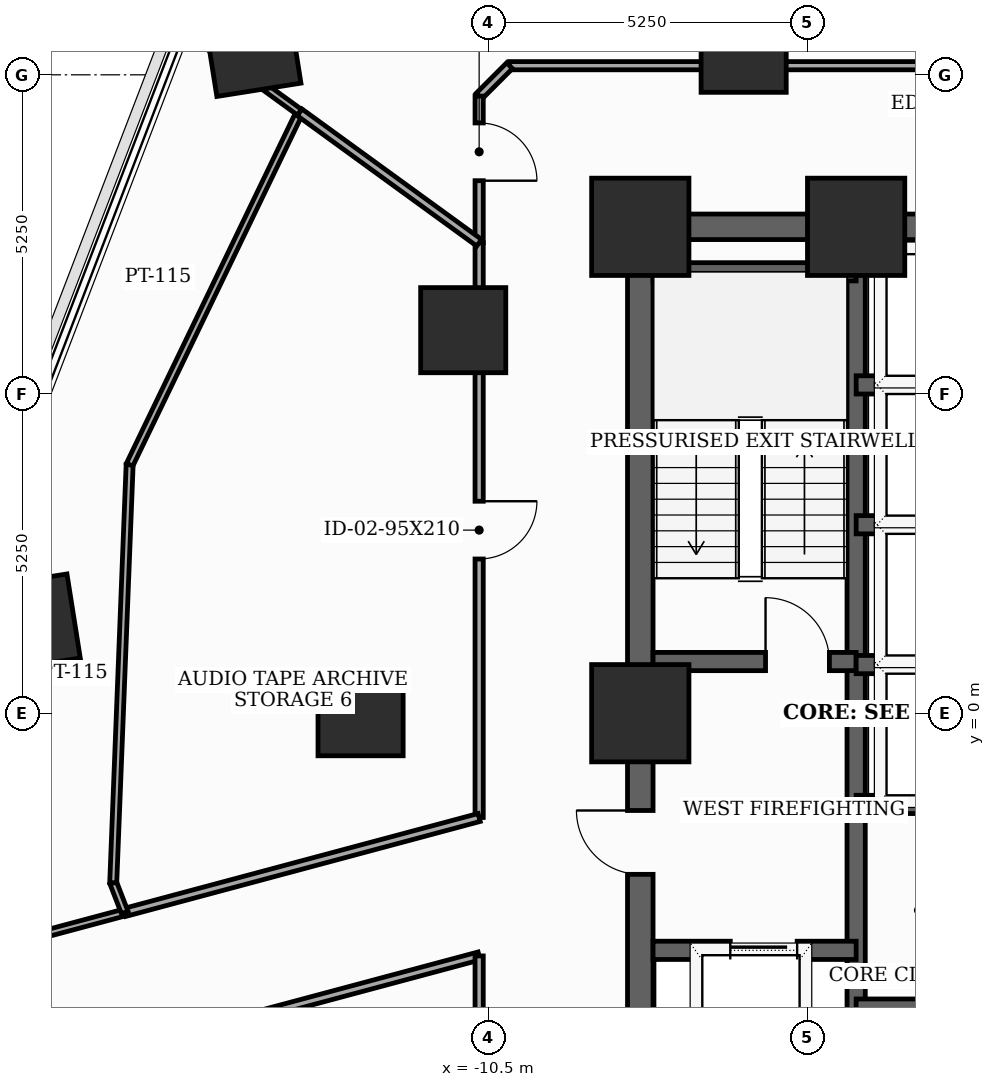
"""IFC4 building model, lengths in metres.
Left out: names, types, materials, properties, quantities, classifications, styles, units other than length and angle.
Written with IfcOpenShell. Run it as: python <this file> out.ifc"""

import sys

from ifc_helpers import new_model, si_unit, direction, frame, frame_2d, origin, origin_2d, place, context, subcontext, project, spatial, rectangle, extrude, element, fill, save


model = new_model("IFC4")
c1 = context("Model", 3, precision=1e-05, world=origin(), true_north=direction((0.0, 1.0)))
c2 = subcontext(c1, "Body", "Model", "MODEL_VIEW")
j1 = project(units=[si_unit("LENGTHUNIT", "METRE"), si_unit("PLANEANGLEUNIT", "RADIAN")], contexts=[c1])
p1 = place(None, origin())
s1 = spatial("IfcSite", under=j1, at=p1, CompositionType="ELEMENT")
p2 = place(p1, origin())
s2 = spatial("IfcBuilding", under=s1, at=p2, CompositionType="ELEMENT")
p3 = place(p2, frame((0.0, 0.0, 74.1)))
s3 = spatial("IfcBuildingStorey", under=s2, at=p3, CompositionType="ELEMENT", Elevation=74.1)
for number, where, z_axis, x_axis in (
    (1, (-4.45, 8.0, 0.0), (0.0, 0.0, 1.0), (1.0, 0.0, 0.0)),
    (2, (-8.0, 8.0, 0.0), (0.0, 0.0, 1.0), (1.0, 0.0, 0.0)),
    (3, (-8.0, 0.0, 0.0), (0.0, 0.0, 1.0), (1.0, 0.0, 0.0)),
):
    element("IfcColumn", number, at=place(p3, frame(where, z_axis=z_axis, x_axis=x_axis)), inside=s3, PredefinedType="COLUMN", context=c2, shape_type="SweptSolid", body=[
        extrude(rectangle(XDim=1.6, YDim=1.6, at=origin_2d()), origin(), (0.0, 0.0, 1.0), 3.7),
    ])
for number, where, z_axis, x_axis in (
    (4, (-6.3, 10.912, 0.0), (0.0, 0.0, 1.0), (1.0, 0.0, 0.0)),
    (5, (-10.912, 6.3, 0.0), (0.0, 0.0, 1.0), (1.0, 0.0, 0.0)),
    (6, (-12.6, 0.0, 0.0), (0.0, 0.0, 1.0), (1.0, 0.0, 0.0)),
    (7, (-14.381, 10.945, 0.0), (0.0, 0.0, 1.0), (0.988, 0.156, 0.0)),
    (8, (-18.011, 1.49, 0.0), (0.0, 0.0, 1.0), (0.988, 0.156, 0.0)),
):
    element("IfcColumn", number, at=place(p3, frame(where, z_axis=z_axis, x_axis=x_axis)), inside=s3, PredefinedType="COLUMN", context=c2, shape_type="SweptSolid", body=[
        extrude(rectangle(XDim=1.4, YDim=1.4, at=origin_2d()), origin(), (0.0, 0.0, 1.0), 3.7),
    ])
p4 = place(p3, frame((-8.0, -8.0, 0.0), z_axis=(0.0, 0.0, 1.0), x_axis=(0.0, 1.0, 0.0)))
e9 = element("IfcWall", 9, at=p4, inside=s3, PredefinedType="SHEAR", context=c2, shape_type="SweptSolid", body=[
    extrude(rectangle(XDim=16.0, YDim=0.42, at=frame_2d((8.0, 0.0))), origin(), (0.0, 0.0, 1.0), 3.5),
])
p5 = place(p4, frame((1.002, 0.0, 0.0)))
e10 = element("IfcOpeningElement", 10, at=p5, cuts=e9, PredefinedType="OPENING", context=c2, shape_type="SweptSolid", body=[
    extrude(rectangle(XDim=0.85, YDim=2.02, at=frame_2d((0.425, 1.01))), frame((0.0, 0.22, 0.0), z_axis=(0.0, -1.0, 0.0), x_axis=(1.0, 0.0, 0.0)), (0.0, 0.0, 1.0), 0.44),
])
p6 = place(p4, frame((5.35, 0.0, 0.0)))
e11 = element("IfcOpeningElement", 11, at=p6, cuts=e9, PredefinedType="OPENING", context=c2, shape_type="SweptSolid", body=[
    extrude(rectangle(XDim=1.05, YDim=2.15, at=frame_2d((0.525, 1.075))), frame((0.0, 0.22, 0.0), z_axis=(0.0, -1.0, 0.0), x_axis=(1.0, 0.0, 0.0)), (0.0, 0.0, 1.0), 0.44),
])
p7 = place(p3, frame((-8.0, 8.0, 0.0), z_axis=(0.0, 0.0, 1.0), x_axis=(1.0, 0.0, 0.0)))
e12 = element("IfcWall", 12, at=p7, inside=s3, PredefinedType="SHEAR", context=c2, shape_type="SweptSolid", body=[
    extrude(rectangle(XDim=16.0, YDim=0.42, at=frame_2d((8.0, 0.0))), origin(), (0.0, 0.0, 1.0), 3.5),
])
p8 = place(p7, frame((7.1, 0.0, 0.0)))
e13 = element("IfcOpeningElement", 13, at=p8, cuts=e12, PredefinedType="OPENING", context=c2, shape_type="SweptSolid", body=[
    extrude(rectangle(XDim=1.8, YDim=2.15, at=frame_2d((0.9, 1.075))), frame((0.0, 0.22, 0.0), z_axis=(0.0, -1.0, 0.0), x_axis=(1.0, 0.0, 0.0)), (0.0, 0.0, 1.0), 0.44),
])
p9 = place(p3, frame((-4.45, -7.79, 0.0), z_axis=(0.0, 0.0, 1.0), x_axis=(0.0, 1.0, 0.0)))
e14 = element("IfcWall", 14, at=p9, inside=s3, PredefinedType="SHEAR", context=c2, shape_type="SweptSolid", body=[
    extrude(rectangle(XDim=15.58, YDim=0.3, at=frame_2d((7.79, 0.0))), origin(), (0.0, 0.0, 1.0), 3.5),
])
p10 = place(p3, frame((-7.79, 0.85, 0.0), z_axis=(0.0, 0.0, 1.0), x_axis=(1.0, 0.0, 0.0)))
e15 = element("IfcWall", 15, at=p10, inside=s3, PredefinedType="SHEAR", context=c2, shape_type="SweptSolid", body=[
    extrude(rectangle(XDim=3.34, YDim=0.3, at=frame_2d((1.67, 0.0))), origin(), (0.0, 0.0, 1.0), 3.5),
])
p11 = place(p10, frame((1.85, 0.0, 0.0)))
e16 = element("IfcOpeningElement", 16, at=p11, cuts=e15, PredefinedType="OPENING", context=c2, shape_type="SweptSolid", body=[
    extrude(rectangle(XDim=1.05, YDim=2.15, at=frame_2d((0.525, 1.075))), frame((0.0, 0.16, 0.0), z_axis=(0.0, -1.0, 0.0), x_axis=(1.0, 0.0, 0.0)), (0.0, 0.0, 1.0), 0.32),
])
p12 = place(p3, frame((-7.79, 7.26, 0.0), z_axis=(0.0, 0.0, 1.0), x_axis=(1.0, 0.0, 0.0)))
e17 = element("IfcWall", 17, at=p12, inside=s3, PredefinedType="SHEAR", context=c2, shape_type="SweptSolid", body=[
    extrude(rectangle(XDim=3.34, YDim=0.3, at=frame_2d((1.67, 0.0))), origin(), (0.0, 0.0, 1.0), 3.5),
])
p13 = place(p3, frame((-7.79, -3.9, 0.0), z_axis=(0.0, 0.0, 1.0), x_axis=(1.0, 0.0, 0.0)))
e18 = element("IfcWall", 18, at=p13, inside=s3, PredefinedType="SHEAR", context=c2, shape_type="SweptSolid", body=[
    extrude(rectangle(XDim=3.34, YDim=0.3, at=frame_2d((1.67, 0.0))), origin(), (0.0, 0.0, 1.0), 3.5),
])
p14 = place(p13, frame((1.27, 0.0, 0.0)))
e19 = element("IfcOpeningElement", 19, at=p14, cuts=e18, PredefinedType="OPENING", context=c2, shape_type="SweptSolid", body=[
    extrude(rectangle(XDim=1.1, YDim=2.1, at=frame_2d((0.55, 1.05))), frame((0.0, 0.16, 0.0), z_axis=(0.0, -1.0, 0.0), x_axis=(1.0, 0.0, 0.0)), (0.0, 0.0, 1.0), 0.32),
])
p15 = place(p3, frame((-4.45, -4.85, 0.0), z_axis=(0.0, 0.0, 1.0), x_axis=(1.0, 0.0, 0.0)))
e20 = element("IfcWall", 20, at=p15, inside=s3, PredefinedType="SHEAR", context=c2, shape_type="SweptSolid", body=[
    extrude(rectangle(XDim=8.9, YDim=0.3, at=frame_2d((4.45, 0.0))), origin(), (0.0, 0.0, 1.0), 3.5),
])
for number, where, z_axis, x_axis in (
    (21, (-4.45, -1.5, 0.0), (0.0, 0.0, 1.0), (1.0, 0.0, 0.0)),
    (22, (-4.45, 0.8, 0.0), (0.0, 0.0, 1.0), (1.0, 0.0, 0.0)),
    (23, (-4.45, 3.1, 0.0), (0.0, 0.0, 1.0), (1.0, 0.0, 0.0)),
    (24, (-4.45, 5.4, 0.0), (0.0, 0.0, 1.0), (1.0, 0.0, 0.0)),
):
    element("IfcWall", number, at=place(p3, frame(where, z_axis=z_axis, x_axis=x_axis)), inside=s3, PredefinedType="SHEAR", context=c2, shape_type="SweptSolid", body=[
        extrude(rectangle(XDim=2.77, YDim=0.3, at=frame_2d((1.385, 0.0))), origin(), (0.0, 0.0, 1.0), 3.5),
    ])
p16 = place(p3, frame((-15.677, -5.339, 0.0), z_axis=(0.0, 0.0, 1.0), x_axis=(0.965918107115, 0.258847851734, 0.0)))
e25 = element("IfcWall", 25, at=p16, inside=s3, PredefinedType="PARTITIONING", context=c2, shape_type="SweptSolid", body=[
    extrude(rectangle(XDim=5.205, YDim=0.135, at=frame_2d((2.602, 0.0))), origin(), (0.0, 0.0, 1.0), 2.785),
])
p17 = place(p3, frame((-10.65, -3.992, 0.0), z_axis=(0.0, 0.0, 1.0), x_axis=(0.0, -1.0, 0.0)))
e26 = element("IfcWall", 26, at=p17, inside=s3, PredefinedType="PARTITIONING", context=c2, shape_type="SweptSolid", body=[
    extrude(rectangle(XDim=6.158, YDim=0.135, at=frame_2d((3.079, 0.0))), origin(), (0.0, 0.0, 1.0), 2.785),
])
p18 = place(p17, frame((4.451, 0.0, 0.0)))
e27 = element("IfcOpeningElement", 27, at=p18, cuts=e26, PredefinedType="OPENING", context=c2, shape_type="SweptSolid", body=[
    extrude(rectangle(XDim=0.95, YDim=2.1, at=frame_2d((0.475, 1.05))), frame((0.0, 0.077, 0.0), z_axis=(0.0, -1.0, 0.0), x_axis=(1.0, 0.0, 0.0)), (0.0, 0.0, 1.0), 0.155),
])
p19 = place(p3, frame((-16.479, -3.277, 0.0), z_axis=(0.0, 0.0, 1.0), x_axis=(-0.965962825479, -0.258680922747, 0.0)))
e28 = element("IfcWall", 28, at=p19, inside=s3, PredefinedType="PARTITIONING", context=c2, shape_type="SweptSolid", body=[
    extrude(rectangle(XDim=3.835, YDim=0.115, at=frame_2d((1.917, 0.0))), origin(), (0.0, 0.0, 1.0), 2.935),
])
p20 = place(p3, frame((-10.65, 7.738, 0.0), z_axis=(0.0, 0.0, 1.0), x_axis=(0.0, -1.0, 0.0)))
e29 = element("IfcWall", 29, at=p20, inside=s3, PredefinedType="PARTITIONING", context=c2, shape_type="SweptSolid", body=[
    extrude(rectangle(XDim=9.453, YDim=0.135, at=frame_2d((4.727, 0.0))), origin(), (0.0, 0.0, 1.0), 2.785),
])
p21 = place(p20, frame((4.251, 0.0, 0.0)))
e30 = element("IfcOpeningElement", 30, at=p21, cuts=e29, PredefinedType="OPENING", context=c2, shape_type="SweptSolid", body=[
    extrude(rectangle(XDim=0.95, YDim=2.1, at=frame_2d((0.475, 1.05))), frame((0.0, 0.077, 0.0), z_axis=(0.0, -1.0, 0.0), x_axis=(1.0, 0.0, 0.0)), (0.0, 0.0, 1.0), 0.155),
])
p22 = place(p3, frame((-10.65, -1.715, 0.0), z_axis=(0.0, 0.0, 1.0), x_axis=(-0.965921324617, -0.258835844987, 0.0)))
e31 = element("IfcWall", 31, at=p22, inside=s3, PredefinedType="PARTITIONING", context=c2, shape_type="SweptSolid", body=[
    extrude(rectangle(XDim=6.035, YDim=0.135, at=frame_2d((3.017, 0.0))), origin(), (0.0, 0.0, 1.0), 2.785),
])
p23 = place(p3, frame((-2.655, 10.65, 0.0), z_axis=(0.0, 0.0, 1.0), x_axis=(-1.0, 0.0, 0.0)))
e32 = element("IfcWall", 32, at=p23, inside=s3, PredefinedType="PARTITIONING", context=c2, shape_type="SweptSolid", body=[
    extrude(rectangle(XDim=7.495, YDim=0.135, at=frame_2d((3.748, 0.0))), origin(), (0.0, 0.0, 1.0), 2.785),
])
p24 = place(p3, frame((-10.15, 10.65, 0.0), z_axis=(0.0, 0.0, 1.0), x_axis=(-0.707106781187, -0.707106781187, 0.0)))
e33 = element("IfcWall", 33, at=p24, inside=s3, PredefinedType="PARTITIONING", context=c2, shape_type="SweptSolid", body=[
    extrude(rectangle(XDim=0.707, YDim=0.135, at=frame_2d((0.354, 0.0))), origin(), (0.0, 0.0, 1.0), 3.5),
])
p25 = place(p3, frame((-10.65, 10.15, 0.0), z_axis=(0.0, 0.0, 1.0), x_axis=(0.0, -1.0, 0.0)))
e34 = element("IfcWall", 34, at=p25, inside=s3, PredefinedType="PARTITIONING", context=c2, shape_type="SweptSolid", body=[
    extrude(rectangle(XDim=2.412, YDim=0.135, at=frame_2d((1.206, 0.0))), origin(), (0.0, 0.0, 1.0), 3.5),
])
p26 = place(p25, frame((0.442, 0.0, 0.0)))
e35 = element("IfcOpeningElement", 35, at=p26, cuts=e34, PredefinedType="OPENING", context=c2, shape_type="SweptSolid", body=[
    extrude(rectangle(XDim=0.95, YDim=2.1, at=frame_2d((0.475, 1.05))), frame((0.0, 0.077, 0.0), z_axis=(0.0, -1.0, 0.0), x_axis=(1.0, 0.0, 0.0)), (0.0, 0.0, 1.0), 0.155),
])
p27 = place(p3, frame((-3.806, 15.265, 0.0), z_axis=(0.0, 0.0, 1.0), x_axis=(0.241967938053, -0.970284245443, 0.0)))
e36 = element("IfcWall", 36, at=p27, inside=s3, PredefinedType="PARTITIONING", context=c2, shape_type="SweptSolid", body=[
    extrude(rectangle(XDim=4.756, YDim=0.135, at=frame_2d((2.378, 0.0))), origin(), (0.0, 0.0, 1.0), 2.785),
])
p28 = place(p3, frame((-16.479, -3.277, 0.0), z_axis=(0.0, 0.0, 1.0), x_axis=(-0.361072625613, 0.932537698451, 0.0)))
e37 = element("IfcWall", 37, at=p28, inside=s3, PredefinedType="PARTITIONING", context=c2, shape_type="SweptSolid", body=[
    extrude(rectangle(XDim=0.523, YDim=0.115, at=frame_2d((0.262, 0.0))), origin(), (0.0, 0.0, 1.0), 3.5),
])
p29 = place(p3, frame((-16.668, -2.789, 0.0), z_axis=(0.0, 0.0, 1.0), x_axis=(0.039234181612, 0.99923004308, 0.0)))
e38 = element("IfcWall", 38, at=p29, inside=s3, PredefinedType="PARTITIONING", context=c2, shape_type="SweptSolid", body=[
    extrude(rectangle(XDim=6.882, YDim=0.115, at=frame_2d((3.441, 0.0))), origin(), (0.0, 0.0, 1.0), 2.785),
])
p30 = place(p3, frame((-16.398, 4.088, 0.0), z_axis=(0.0, 0.0, 1.0), x_axis=(0.434403094272, 0.900718575187, 0.0)))
e39 = element("IfcWall", 39, at=p30, inside=s3, PredefinedType="PARTITIONING", context=c2, shape_type="SweptSolid", body=[
    extrude(rectangle(XDim=6.434, YDim=0.115, at=frame_2d((3.217, 0.0))), origin(), (0.0, 0.0, 1.0), 2.785),
])
p31 = place(p3, frame((-13.603, 9.883, 0.0), z_axis=(0.0, 0.0, 1.0), x_axis=(-0.808955448279, 0.587869953901, 0.0)))
e40 = element("IfcWall", 40, at=p31, inside=s3, PredefinedType="PARTITIONING", context=c2, shape_type="SweptSolid", body=[
    extrude(rectangle(XDim=2.358, YDim=0.115, at=frame_2d((1.179, 0.0))), origin(), (0.0, 0.0, 1.0), 2.785),
])
p32 = place(p3, frame((-10.65, 7.738, 0.0), z_axis=(0.0, 0.0, 1.0), x_axis=(-0.809088823189, 0.587686375706, 0.0)))
e41 = element("IfcWall", 41, at=p32, inside=s3, PredefinedType="PARTITIONING", context=c2, shape_type="SweptSolid", body=[
    extrude(rectangle(XDim=3.65, YDim=0.135, at=frame_2d((1.825, 0.0))), origin(), (0.0, 0.0, 1.0), 2.785),
])
p33 = place(p6, origin())
e42 = element("IfcDoor", 42, at=p33, inside=s3, OperationType="SINGLE_SWING_RIGHT", PredefinedType="DOOR", context=c2, shape_type="SweptSolid", body=[
    extrude(rectangle(XDim=1.05, YDim=2.15, at=frame_2d((0.525, 1.075))), frame((0.0, 0.025, 0.0), z_axis=(0.0, -1.0, 0.0), x_axis=(1.0, 0.0, 0.0)), (0.0, 0.0, 1.0), 0.05),
])
fill(e11, e42)
p34 = place(p11, origin())
e43 = element("IfcDoor", 43, at=p34, inside=s3, OperationType="SINGLE_SWING_LEFT", PredefinedType="DOOR", context=c2, shape_type="SweptSolid", body=[
    extrude(rectangle(XDim=1.05, YDim=2.15, at=frame_2d((0.525, 1.075))), frame((0.0, 0.025, 0.0), z_axis=(0.0, -1.0, 0.0), x_axis=(1.0, 0.0, 0.0)), (0.0, 0.0, 1.0), 0.05),
])
fill(e16, e43)
p35 = place(p14, origin())
e44 = element("IfcDoor", 44, at=p35, inside=s3, OperationType="SLIDING_TO_LEFT", PredefinedType="DOOR", context=c2, shape_type="SweptSolid", body=[
    extrude(rectangle(XDim=1.1, YDim=2.1, at=frame_2d((0.55, 1.05))), frame((0.0, 0.025, 0.0), z_axis=(0.0, -1.0, 0.0), x_axis=(1.0, 0.0, 0.0)), (0.0, 0.0, 1.0), 0.05),
])
fill(e19, e44)
p36 = place(p21, origin())
e45 = element("IfcDoor", 45, at=p36, inside=s3, OperationType="SINGLE_SWING_LEFT", PredefinedType="DOOR", context=c2, shape_type="SweptSolid", body=[
    extrude(rectangle(XDim=0.95, YDim=2.1, at=frame_2d((0.475, 1.05))), frame((0.0, 0.025, 0.0), z_axis=(0.0, -1.0, 0.0), x_axis=(1.0, 0.0, 0.0)), (0.0, 0.0, 1.0), 0.05),
])
fill(e30, e45)
p37 = place(p26, origin())
e46 = element("IfcDoor", 46, at=p37, inside=s3, OperationType="SINGLE_SWING_RIGHT", PredefinedType="DOOR", context=c2, shape_type="SweptSolid", body=[
    extrude(rectangle(XDim=0.95, YDim=2.1, at=frame_2d((0.475, 1.05))), frame((0.0, 0.025, 0.0), z_axis=(0.0, -1.0, 0.0), x_axis=(1.0, 0.0, 0.0)), (0.0, 0.0, 1.0), 0.05),
])
fill(e35, e46)
save(model, sys.argv[1])
